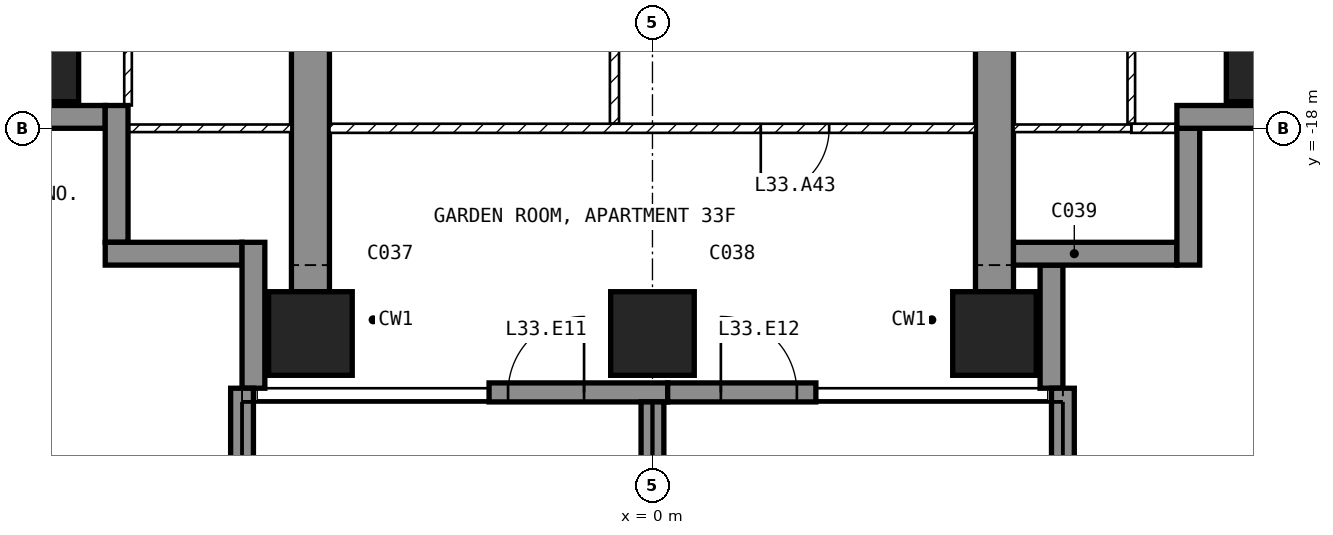
"""IFC4 building model, lengths in metres.
Left out: names, types, materials, properties, quantities, classifications, styles, units other than length and angle.
Written with IfcOpenShell. Run it as: python <this file> out.ifc"""

import sys

from ifc_helpers import new_model, si_unit, direction, frame, frame_2d, origin, origin_2d, place, context, subcontext, project, spatial, polyline, rectangle, outline, extrude, element, fill, save


model = new_model("IFC4")
c1 = context("Model", 3, precision=1e-05, world=origin(), true_north=direction((0.0, 1.0)))
c2 = subcontext(c1, "Body", "Model", "MODEL_VIEW")
j1 = project(units=[si_unit("LENGTHUNIT", "METRE"), si_unit("PLANEANGLEUNIT", "RADIAN")], contexts=[c1])
p1 = place(None, origin())
s1 = spatial("IfcSite", under=j1, at=p1, CompositionType="ELEMENT")
p2 = place(p1, origin())
s2 = spatial("IfcBuilding", under=s1, at=p2, CompositionType="ELEMENT")
p3 = place(p2, frame((0.0, 0.0, 137.4)))
s3 = spatial("IfcBuildingStorey", under=s2, at=p3, CompositionType="ELEMENT", Elevation=137.4)
for number, where, z_axis, x_axis in (
    (1, (-8.1, -17.1, -0.25), (0.0, 0.0, 1.0), (1.0, 0.0, 0.0)),
    (2, (-4.5, -20.7, -0.25), (0.0, 0.0, 1.0), (1.0, 0.0, 0.0)),
    (3, (0.0, -20.7, -0.25), (0.0, 0.0, 1.0), (1.0, 0.0, 0.0)),
    (4, (4.5, -20.7, -0.25), (0.0, 0.0, 1.0), (1.0, 0.0, 0.0)),
    (5, (8.1, -17.1, -0.25), (0.0, 0.0, 1.0), (1.0, 0.0, 0.0)),
):
    element("IfcColumn", number, at=place(p3, frame(where, z_axis=z_axis, x_axis=x_axis)), inside=s3, PredefinedType="COLUMN", context=c2, shape_type="SweptSolid", body=[
        extrude(rectangle(XDim=1.1, YDim=1.1, at=origin_2d()), origin(), (0.0, 0.0, 1.0), 3.5),
    ])
for number, where, z_axis, x_axis in (
    (6, (-4.75, -20.15, -0.25), (1.0, 0.0, 0.0), (0.0, 1.0, 0.0)),
    (7, (4.25, -20.15, -0.25), (1.0, 0.0, 0.0), (0.0, 1.0, 0.0)),
):
    element("IfcWall", number, at=place(p3, frame(where, z_axis=z_axis, x_axis=x_axis)), inside=s3, PredefinedType="SHEAR", context=c2, shape_type="SweptSolid", body=[
        extrude(outline(polyline([(0.0, 0.0), (6.65, 0.0), (6.65, 2.65), (9.05, 2.65), (9.05, 0.0), (11.15, 0.0), (11.15, 3.5), (0.0, 3.5), (0.0, 0.0)])), origin(), (0.0, 0.0, 1.0), 0.5),
    ])
p4 = place(p3, frame((-2.15, -21.475, 0.0), z_axis=(0.0, 0.0, 1.0), x_axis=(1.0, 0.0, 0.0)))
e8 = element("IfcWall", 8, at=p4, inside=s3, PredefinedType="SOLIDWALL", context=c2, shape_type="SweptSolid", body=[
    extrude(rectangle(XDim=2.35, YDim=0.25, at=frame_2d((1.175, 0.0))), origin(), (0.0, 0.0, 1.0), 3.25),
])
p5 = place(p4, frame((0.25, 0.0, 0.0)))
e9 = element("IfcOpeningElement", 9, at=p5, cuts=e8, PredefinedType="OPENING", context=c2, shape_type="SweptSolid", body=[
    extrude(rectangle(XDim=1.0, YDim=2.4, at=frame_2d((0.5, 1.2))), frame((0.0, 0.135, 0.0), z_axis=(0.0, -1.0, 0.0), x_axis=(1.0, 0.0, 0.0)), (0.0, 0.0, 1.0), 0.27),
])
p6 = place(p3, frame((0.2, -21.475, 0.0), z_axis=(0.0, 0.0, 1.0), x_axis=(1.0, 0.0, 0.0)))
e10 = element("IfcWall", 10, at=p6, inside=s3, PredefinedType="SOLIDWALL", context=c2, shape_type="SweptSolid", body=[
    extrude(rectangle(XDim=1.95, YDim=0.25, at=frame_2d((0.975, 0.0))), origin(), (0.0, 0.0, 1.0), 3.25),
])
p7 = place(p6, frame((0.7, 0.0, 0.0)))
e11 = element("IfcOpeningElement", 11, at=p7, cuts=e10, PredefinedType="OPENING", context=c2, shape_type="SweptSolid", body=[
    extrude(rectangle(XDim=1.0, YDim=2.4, at=frame_2d((0.5, 1.2))), frame((0.0, 0.135, 0.0), z_axis=(0.0, -1.0, 0.0), x_axis=(1.0, 0.0, 0.0)), (0.0, 0.0, 1.0), 0.27),
])
p8 = place(p3, frame((5.25, -21.42, 0.0), z_axis=(0.0, 0.0, 1.0), x_axis=(0.0, 1.0, 0.0)))
e12 = element("IfcWall", 12, at=p8, inside=s3, PredefinedType="SOLIDWALL", context=c2, shape_type="SweptSolid", body=[
    extrude(rectangle(XDim=1.62, YDim=0.3, at=frame_2d((0.81, 0.0))), origin(), (0.0, 0.0, 1.0), 3.25),
])
p9 = place(p3, frame((4.75, -19.65, 0.0), z_axis=(0.0, 0.0, 1.0), x_axis=(1.0, 0.0, 0.0)))
e13 = element("IfcWall", 13, at=p9, inside=s3, PredefinedType="SOLIDWALL", context=c2, shape_type="SweptSolid", body=[
    extrude(rectangle(XDim=2.15, YDim=0.3, at=frame_2d((1.075, 0.0))), origin(), (0.0, 0.0, 1.0), 3.25),
])
p10 = place(p3, frame((7.05, -19.8, 0.0), z_axis=(0.0, 0.0, 1.0), x_axis=(0.0, 1.0, 0.0)))
e14 = element("IfcWall", 14, at=p10, inside=s3, PredefinedType="SOLIDWALL", context=c2, shape_type="SweptSolid", body=[
    extrude(rectangle(XDim=1.8, YDim=0.3, at=frame_2d((0.9, 0.0))), origin(), (0.0, 0.0, 1.0), 3.25),
])
p11 = place(p3, frame((6.9, -17.85, 0.0), z_axis=(0.0, 0.0, 1.0), x_axis=(1.0, 0.0, 0.0)))
e15 = element("IfcWall", 15, at=p11, inside=s3, PredefinedType="SOLIDWALL", context=c2, shape_type="SweptSolid", body=[
    extrude(rectangle(XDim=1.85, YDim=0.3, at=frame_2d((0.925, 0.0))), origin(), (0.0, 0.0, 1.0), 3.25),
])
p12 = place(p3, frame((-8.75, -17.85, 0.0), z_axis=(0.0, 0.0, 1.0), x_axis=(1.0, 0.0, 0.0)))
e16 = element("IfcWall", 16, at=p12, inside=s3, PredefinedType="SOLIDWALL", context=c2, shape_type="SweptSolid", body=[
    extrude(rectangle(XDim=1.55, YDim=0.3, at=frame_2d((0.775, 0.0))), origin(), (0.0, 0.0, 1.0), 3.25),
])
for number, where, z_axis, x_axis in (
    (17, (-7.05, -17.7, 0.0), (0.0, 0.0, 1.0), (0.0, -1.0, 0.0)),
    (18, (-7.2, -19.65, 0.0), (0.0, 0.0, 1.0), (1.0, 0.0, 0.0)),
):
    element("IfcWall", number, at=place(p3, frame(where, z_axis=z_axis, x_axis=x_axis)), inside=s3, PredefinedType="SOLIDWALL", context=c2, shape_type="SweptSolid", body=[
        extrude(rectangle(XDim=1.8, YDim=0.3, at=frame_2d((0.9, 0.0))), origin(), (0.0, 0.0, 1.0), 3.25),
    ])
p13 = place(p3, frame((-5.25, -19.5, 0.0), z_axis=(0.0, 0.0, 1.0), x_axis=(0.0, -1.0, 0.0)))
e19 = element("IfcWall", 19, at=p13, inside=s3, PredefinedType="SOLIDWALL", context=c2, shape_type="SweptSolid", body=[
    extrude(rectangle(XDim=1.92, YDim=0.3, at=frame_2d((0.96, 0.0))), origin(), (0.0, 0.0, 1.0), 3.25),
])
p14 = place(p3, frame((-5.4, -21.42, 0.0), z_axis=(0.0, 0.0, 1.0), x_axis=(0.0, -1.0, 0.0)))
e20 = element("IfcWall", 20, at=p14, inside=s3, PredefinedType="SOLIDWALL", context=c2, shape_type="SweptSolid", body=[
    extrude(rectangle(XDim=2.88, YDim=0.3, at=frame_2d((1.44, 0.0))), origin(), (0.0, 0.0, 1.0), 3.25),
])
p15 = place(p3, frame((0.0, -21.6, 0.0), z_axis=(0.0, 0.0, 1.0), x_axis=(0.0, -1.0, 0.0)))
e21 = element("IfcWall", 21, at=p15, inside=s3, PredefinedType="SOLIDWALL", context=c2, shape_type="SweptSolid", body=[
    extrude(rectangle(XDim=2.7, YDim=0.3, at=frame_2d((1.35, 0.0))), origin(), (0.0, 0.0, 1.0), 3.25),
])
p16 = place(p3, frame((5.4, -21.42, 0.0), z_axis=(0.0, 0.0, 1.0), x_axis=(0.0, -1.0, 0.0)))
e22 = element("IfcWall", 22, at=p16, inside=s3, PredefinedType="SOLIDWALL", context=c2, shape_type="SweptSolid", body=[
    extrude(rectangle(XDim=2.88, YDim=0.3, at=frame_2d((1.44, 0.0))), origin(), (0.0, 0.0, 1.0), 3.25),
])
p17 = place(p3, frame((-0.5, -17.94, 0.0), z_axis=(0.0, 0.0, 1.0), x_axis=(0.0, 1.0, 0.0)))
e23 = element("IfcWall", 23, at=p17, inside=s3, PredefinedType="PARTITIONING", context=c2, shape_type="SweptSolid", body=[
    extrude(rectangle(XDim=2.88, YDim=0.12, at=frame_2d((1.44, 0.0))), origin(), (0.0, 0.0, 1.0), 3.25),
])
p18 = place(p17, frame((0.99, 0.0, 0.0)))
e24 = element("IfcOpeningElement", 24, at=p18, cuts=e23, PredefinedType="OPENING", context=c2, shape_type="SweptSolid", body=[
    extrude(rectangle(XDim=0.9, YDim=2.1, at=frame_2d((0.45, 1.05))), frame((0.0, 0.07, 0.0), z_axis=(0.0, -1.0, 0.0), x_axis=(1.0, 0.0, 0.0)), (0.0, 0.0, 1.0), 0.14),
])
p19 = place(p3, frame((4.25, -18.0, 0.0), z_axis=(0.0, 0.0, 1.0), x_axis=(-1.0, 0.0, 0.0)))
e25 = element("IfcWall", 25, at=p19, inside=s3, PredefinedType="PARTITIONING", context=c2, shape_type="SweptSolid", body=[
    extrude(rectangle(XDim=8.5, YDim=0.12, at=frame_2d((4.25, 0.0))), origin(), (0.0, 0.0, 1.0), 3.25),
])
p20 = place(p19, frame((1.925, 0.0, 0.0)))
e26 = element("IfcOpeningElement", 26, at=p20, cuts=e25, PredefinedType="OPENING", context=c2, shape_type="SweptSolid", body=[
    extrude(rectangle(XDim=0.9, YDim=2.1, at=frame_2d((0.45, 1.05))), frame((0.0, 0.07, 0.0), z_axis=(0.0, -1.0, 0.0), x_axis=(1.0, 0.0, 0.0)), (0.0, 0.0, 1.0), 0.14),
])
p21 = place(p3, frame((6.3, -17.94, 0.0), z_axis=(0.0, 0.0, 1.0), x_axis=(0.0, 1.0, 0.0)))
e27 = element("IfcWall", 27, at=p21, inside=s3, PredefinedType="PARTITIONING", context=c2, shape_type="SweptSolid", body=[
    extrude(rectangle(XDim=3.49, YDim=0.1, at=frame_2d((1.745, 0.0))), origin(), (0.0, 0.0, 1.0), 3.25),
])
p22 = place(p21, frame((1.32, 0.0, 0.0)))
e28 = element("IfcOpeningElement", 28, at=p22, cuts=e27, PredefinedType="OPENING", context=c2, shape_type="SweptSolid", body=[
    extrude(rectangle(XDim=0.85, YDim=2.1, at=frame_2d((0.425, 1.05))), frame((0.0, 0.06, 0.0), z_axis=(0.0, -1.0, 0.0), x_axis=(1.0, 0.0, 0.0)), (0.0, 0.0, 1.0), 0.12),
])
p23 = place(p3, frame((7.12, -18.0, 0.0), z_axis=(0.0, 0.0, 1.0), x_axis=(-1.0, 0.0, 0.0)))
e29 = element("IfcWall", 29, at=p23, inside=s3, PredefinedType="PARTITIONING", context=c2, shape_type="SweptSolid", body=[
    extrude(rectangle(XDim=0.82, YDim=0.12, at=frame_2d((0.41, 0.0))), origin(), (0.0, 0.0, 1.0), 3.25),
])
p24 = place(p3, frame((6.3, -18.0, 0.0), z_axis=(0.0, 0.0, 1.0), x_axis=(-1.0, 0.0, 0.0)))
e30 = element("IfcWall", 30, at=p24, inside=s3, PredefinedType="PARTITIONING", context=c2, shape_type="SweptSolid", body=[
    extrude(rectangle(XDim=1.55, YDim=0.1, at=frame_2d((0.775, 0.0))), origin(), (0.0, 0.0, 1.0), 3.25),
])
p25 = place(p3, frame((-6.9, -14.45, 0.0), z_axis=(0.0, 0.0, 1.0), x_axis=(0.0, -1.0, 0.0)))
e31 = element("IfcWall", 31, at=p25, inside=s3, PredefinedType="PARTITIONING", context=c2, shape_type="SweptSolid", body=[
    extrude(rectangle(XDim=3.25, YDim=0.1, at=frame_2d((1.625, 0.0))), origin(), (0.0, 0.0, 1.0), 3.25),
])
p26 = place(p3, frame((-4.75, -18.0, 0.0), z_axis=(0.0, 0.0, 1.0), x_axis=(-1.0, 0.0, 0.0)))
e32 = element("IfcWall", 32, at=p26, inside=s3, PredefinedType="PARTITIONING", context=c2, shape_type="SweptSolid", body=[
    extrude(rectangle(XDim=2.37, YDim=0.1, at=frame_2d((1.185, 0.0))), origin(), (0.0, 0.0, 1.0), 3.25),
])
p27 = place(p5, origin())
e33 = element("IfcDoor", 33, at=p27, inside=s3, OperationType="SINGLE_SWING_RIGHT", PredefinedType="DOOR", context=c2, shape_type="SweptSolid", body=[
    extrude(rectangle(XDim=1.0, YDim=2.4, at=frame_2d((0.5, 1.2))), frame((0.0, 0.025, 0.0), z_axis=(0.0, -1.0, 0.0), x_axis=(1.0, 0.0, 0.0)), (0.0, 0.0, 1.0), 0.05),
])
fill(e9, e33)
p28 = place(p7, origin())
e34 = element("IfcDoor", 34, at=p28, inside=s3, OperationType="SINGLE_SWING_LEFT", PredefinedType="DOOR", context=c2, shape_type="SweptSolid", body=[
    extrude(rectangle(XDim=1.0, YDim=2.4, at=frame_2d((0.5, 1.2))), frame((0.0, 0.025, 0.0), z_axis=(0.0, -1.0, 0.0), x_axis=(1.0, 0.0, 0.0)), (0.0, 0.0, 1.0), 0.05),
])
fill(e11, e34)
p29 = place(p20, origin())
e35 = element("IfcDoor", 35, at=p29, inside=s3, OperationType="SINGLE_SWING_RIGHT", PredefinedType="DOOR", context=c2, shape_type="SweptSolid", body=[
    extrude(rectangle(XDim=0.9, YDim=2.1, at=frame_2d((0.45, 1.05))), frame((0.0, 0.025, 0.0), z_axis=(0.0, -1.0, 0.0), x_axis=(1.0, 0.0, 0.0)), (0.0, 0.0, 1.0), 0.05),
])
fill(e26, e35)
save(model, sys.argv[1])
